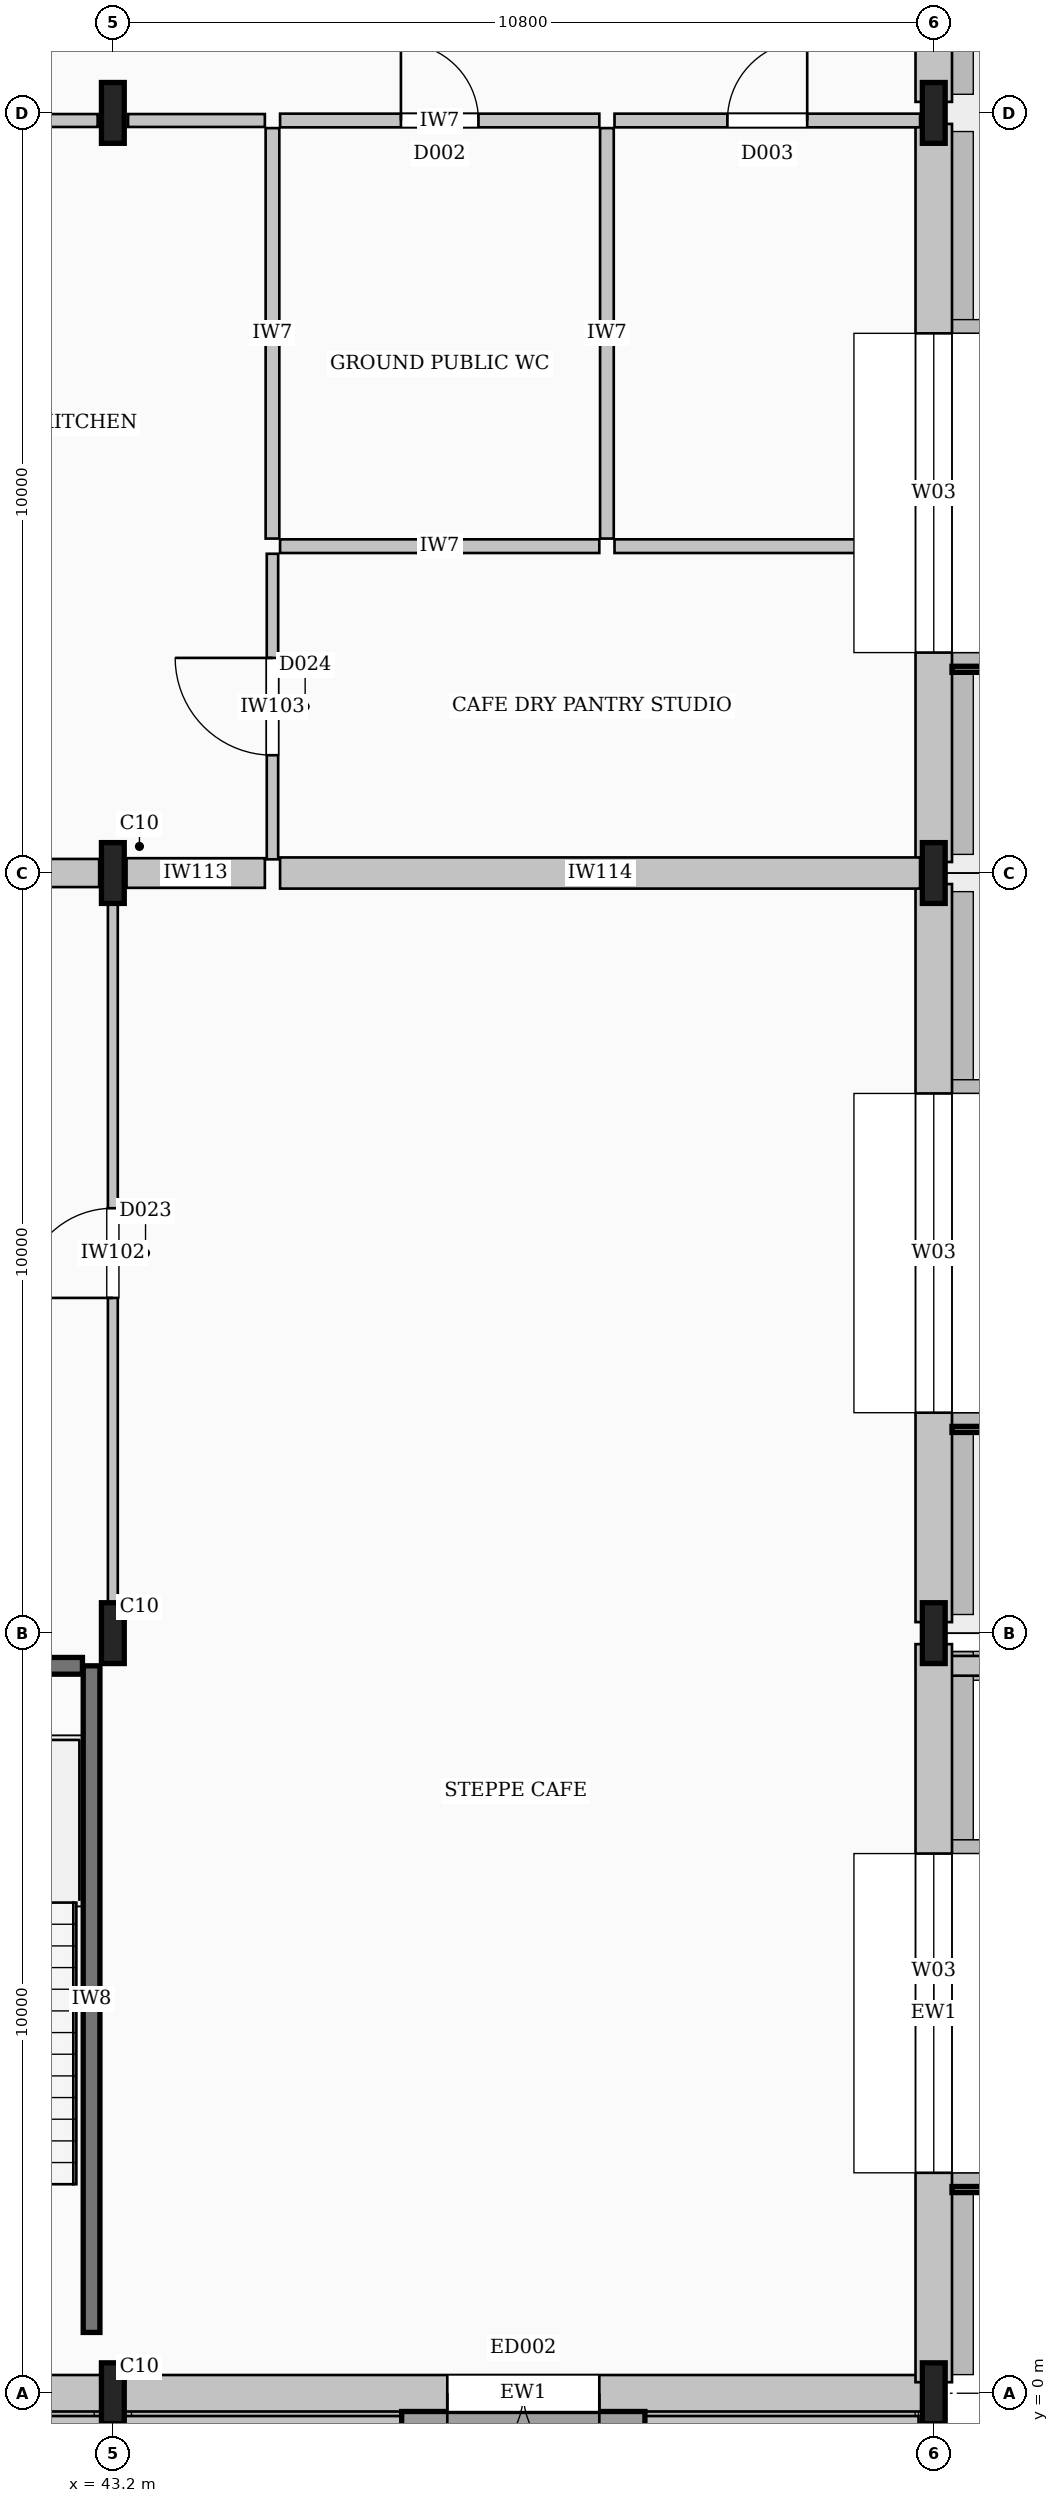
"""IFC4 building model, lengths in metres.
Left out: names, types, materials, properties, quantities, classifications, styles, units other than length and angle.
Written with IfcOpenShell. Run it as: python <this file> out.ifc"""

import sys

from ifc_helpers import new_model, si_unit, direction, frame, frame_2d, origin, origin_2d, place, context, subcontext, project, spatial, rectangle, i_section, extrude, element, fill, save


model = new_model("IFC4")
c1 = context("Model", 3, precision=1e-05, world=origin(), true_north=direction((0.0, 1.0)))
c2 = subcontext(c1, "Body", "Model", "MODEL_VIEW")
j1 = project(units=[si_unit("LENGTHUNIT", "METRE"), si_unit("PLANEANGLEUNIT", "RADIAN")], contexts=[c1])
p1 = place(None, origin())
s1 = spatial("IfcSite", under=j1, at=p1, CompositionType="ELEMENT")
p2 = place(p1, origin())
s2 = spatial("IfcBuilding", under=s1, at=p2, CompositionType="ELEMENT")
p3 = place(p2, origin())
s3 = spatial("IfcBuildingStorey", under=s2, at=p3, CompositionType="ELEMENT", Elevation=0.0)
for number, where, z_axis, x_axis in (
    (1, (43.2, 0.0, 0.0), (0.0, 0.0, 1.0), (1.0, 0.0, 0.0)),
    (2, (43.2, 10.0, 0.0), (0.0, 0.0, 1.0), (1.0, 0.0, 0.0)),
    (3, (43.2, 20.0, 0.0), (0.0, 0.0, 1.0), (1.0, 0.0, 0.0)),
    (4, (43.2, 30.0, 0.0), (0.0, 0.0, 1.0), (1.0, 0.0, 0.0)),
    (5, (54.0, 0.0, 0.0), (0.0, 0.0, 1.0), (1.0, 0.0, 0.0)),
    (6, (54.0, 10.0, 0.0), (0.0, 0.0, 1.0), (1.0, 0.0, 0.0)),
    (7, (54.0, 20.0, 0.0), (0.0, 0.0, 1.0), (1.0, 0.0, 0.0)),
    (8, (54.0, 30.0, 0.0), (0.0, 0.0, 1.0), (1.0, 0.0, 0.0)),
):
    element("IfcColumn", number, at=place(p3, frame(where, z_axis=z_axis, x_axis=x_axis)), inside=s3, PredefinedType="COLUMN", context=c2, shape_type="SweptSolid", body=[
        extrude(i_section(OverallWidth=0.3, OverallDepth=0.8, WebThickness=0.018, FlangeThickness=0.033, FilletRadius=0.03, at=origin_2d()), origin(), (0.0, 0.0, 1.0), 4.8),
    ])
for number, where, z_axis, x_axis in (
    (9, (0.2, -0.43, -1.38), (0.0, 0.0, 1.0), (1.0, 0.0, 0.0)),
    (10, (54.2, 9.57, -1.38), (0.0, 0.0, 1.0), (1.0, 0.0, 0.0)),
):
    element("IfcWall", number, at=place(p3, frame(where, z_axis=z_axis, x_axis=x_axis)), inside=s3, PredefinedType="PARAPET", context=c2, shape_type="SweptSolid", body=[
        extrude(rectangle(XDim=53.6, YDim=0.26, at=frame_2d((26.8, 0.0))), origin(), (0.0, 0.0, 1.0), 1.36),
    ])
p4 = place(p3, frame((32.545, 0.0, 0.0), z_axis=(0.0, 0.0, 1.0), x_axis=(1.0, 0.0, 0.0)))
e11 = element("IfcWall", 11, at=p4, inside=s3, PredefinedType="STANDARD", context=c2, shape_type="SweptSolid", body=[
    extrude(rectangle(XDim=10.51, YDim=0.48, at=frame_2d((5.255, 0.0))), origin(), (0.0, 0.0, 1.0), 4.069),
])
p5 = place(p4, frame((4.255, 0.0, 0.0)))
e12 = element("IfcOpeningElement", 12, at=p5, cuts=e11, PredefinedType="OPENING", context=c2, shape_type="SweptSolid", body=[
    extrude(rectangle(XDim=2.0, YDim=2.3, at=frame_2d((1.0, 1.15))), frame((0.0, 0.25, 0.0), z_axis=(0.0, -1.0, 0.0), x_axis=(1.0, 0.0, 0.0)), (0.0, 0.0, 1.0), 0.5),
])
p6 = place(p3, frame((43.345, 0.0, 0.0), z_axis=(0.0, 0.0, 1.0), x_axis=(1.0, 0.0, 0.0)))
e13 = element("IfcWall", 13, at=p6, inside=s3, PredefinedType="STANDARD", context=c2, shape_type="SweptSolid", body=[
    extrude(rectangle(XDim=10.51, YDim=0.48, at=frame_2d((5.255, 0.0))), origin(), (0.0, 0.0, 1.0), 4.069),
])
p7 = place(p6, frame((4.255, 0.0, 0.0)))
e14 = element("IfcOpeningElement", 14, at=p7, cuts=e13, PredefinedType="OPENING", context=c2, shape_type="SweptSolid", body=[
    extrude(rectangle(XDim=2.0, YDim=2.3, at=frame_2d((1.0, 1.15))), frame((0.0, 0.25, 0.0), z_axis=(0.0, -1.0, 0.0), x_axis=(1.0, 0.0, 0.0)), (0.0, 0.0, 1.0), 0.5),
])
p8 = place(p3, frame((54.0, 0.145, 0.0), z_axis=(0.0, 0.0, 1.0), x_axis=(0.0, 1.0, 0.0)))
e15 = element("IfcWall", 15, at=p8, inside=s3, PredefinedType="STANDARD", context=c2, shape_type="SweptSolid", body=[
    extrude(rectangle(XDim=9.71, YDim=0.48, at=frame_2d((4.855, 0.0))), origin(), (0.0, 0.0, 1.0), 4.56),
])
p9 = place(p8, frame((2.755, 0.0, 0.9)))
e16 = element("IfcOpeningElement", 16, at=p9, cuts=e15, PredefinedType="OPENING", context=c2, shape_type="SweptSolid", body=[
    extrude(rectangle(XDim=4.2, YDim=2.7, at=frame_2d((2.1, 1.35))), frame((0.0, 0.25, 0.0), z_axis=(0.0, -1.0, 0.0), x_axis=(1.0, 0.0, 0.0)), (0.0, 0.0, 1.0), 0.5),
])
p10 = place(p3, frame((54.0, 10.145, 0.0), z_axis=(0.0, 0.0, 1.0), x_axis=(0.0, 1.0, 0.0)))
e17 = element("IfcWall", 17, at=p10, inside=s3, PredefinedType="STANDARD", context=c2, shape_type="SweptSolid", body=[
    extrude(rectangle(XDim=9.71, YDim=0.48, at=frame_2d((4.855, 0.0))), origin(), (0.0, 0.0, 1.0), 4.56),
])
p11 = place(p10, frame((2.755, 0.0, 0.9)))
e18 = element("IfcOpeningElement", 18, at=p11, cuts=e17, PredefinedType="OPENING", context=c2, shape_type="SweptSolid", body=[
    extrude(rectangle(XDim=4.2, YDim=2.7, at=frame_2d((2.1, 1.35))), frame((0.0, 0.25, 0.0), z_axis=(0.0, -1.0, 0.0), x_axis=(1.0, 0.0, 0.0)), (0.0, 0.0, 1.0), 0.5),
])
p12 = place(p3, frame((54.0, 20.145, 0.0), z_axis=(0.0, 0.0, 1.0), x_axis=(0.0, 1.0, 0.0)))
e19 = element("IfcWall", 19, at=p12, inside=s3, PredefinedType="STANDARD", context=c2, shape_type="SweptSolid", body=[
    extrude(rectangle(XDim=9.71, YDim=0.48, at=frame_2d((4.855, 0.0))), origin(), (0.0, 0.0, 1.0), 4.56),
])
p13 = place(p12, frame((2.755, 0.0, 0.9)))
e20 = element("IfcOpeningElement", 20, at=p13, cuts=e19, PredefinedType="OPENING", context=c2, shape_type="SweptSolid", body=[
    extrude(rectangle(XDim=4.2, YDim=2.7, at=frame_2d((2.1, 1.35))), frame((0.0, 0.25, 0.0), z_axis=(0.0, -1.0, 0.0), x_axis=(1.0, 0.0, 0.0)), (0.0, 0.0, 1.0), 0.5),
])
p14 = place(p3, frame((54.0, 30.145, 0.0), z_axis=(0.0, 0.0, 1.0), x_axis=(0.0, 1.0, 0.0)))
e21 = element("IfcWall", 21, at=p14, inside=s3, PredefinedType="STANDARD", context=c2, shape_type="SweptSolid", body=[
    extrude(rectangle(XDim=9.71, YDim=0.48, at=frame_2d((4.855, 0.0))), origin(), (0.0, 0.0, 1.0), 4.56),
])
p15 = place(p14, frame((2.755, 0.0, 0.9)))
e22 = element("IfcOpeningElement", 22, at=p15, cuts=e21, PredefinedType="OPENING", context=c2, shape_type="SweptSolid", body=[
    extrude(rectangle(XDim=4.2, YDim=2.7, at=frame_2d((2.1, 1.35))), frame((0.0, 0.25, 0.0), z_axis=(0.0, -1.0, 0.0), x_axis=(1.0, 0.0, 0.0)), (0.0, 0.0, 1.0), 0.5),
])
p16 = place(p3, frame((42.92, 0.8, 0.0), z_axis=(0.0, 0.0, 1.0), x_axis=(0.0, 1.0, 0.0)))
e23 = element("IfcWall", 23, at=p16, inside=s3, PredefinedType="SHEAR", context=c2, shape_type="SweptSolid", body=[
    extrude(rectangle(XDim=8.77, YDim=0.22, at=frame_2d((4.385, 0.0))), origin(), (0.0, 0.0, 1.0), 4.56),
])
p17 = place(p3, frame((38.4, 9.57, 0.0), z_axis=(0.0, 0.0, 1.0), x_axis=(1.0, 0.0, 0.0)))
e24 = element("IfcWall", 24, at=p17, inside=s3, PredefinedType="SHEAR", context=c2, shape_type="SweptSolid", body=[
    extrude(rectangle(XDim=4.4, YDim=0.22, at=frame_2d((2.2, 0.0))), origin(), (0.0, 0.0, 1.0), 4.56),
])
p18 = place(p3, frame((45.4, 29.9, 0.0), z_axis=(0.0, 0.0, 1.0), x_axis=(1.0, 0.0, 0.0)))
e25 = element("IfcWall", 25, at=p18, inside=s3, PredefinedType="PLUMBINGWALL", context=c2, shape_type="SweptSolid", body=[
    extrude(rectangle(XDim=4.2, YDim=0.18, at=frame_2d((2.1, 0.0))), origin(), (0.0, 0.0, 1.0), 4.069),
])
p19 = place(p18, frame((1.59, 0.0, 0.0)))
e26 = element("IfcOpeningElement", 26, at=p19, cuts=e25, PredefinedType="OPENING", context=c2, shape_type="SweptSolid", body=[
    extrude(rectangle(XDim=1.02, YDim=2.15, at=frame_2d((0.51, 1.075))), frame((0.0, 0.1, 0.0), z_axis=(0.0, -1.0, 0.0), x_axis=(1.0, 0.0, 0.0)), (0.0, 0.0, 1.0), 0.2),
])
p20 = place(p3, frame((49.8, 29.9, 0.0), z_axis=(0.0, 0.0, 1.0), x_axis=(1.0, 0.0, 0.0)))
e27 = element("IfcWall", 27, at=p20, inside=s3, PredefinedType="PLUMBINGWALL", context=c2, shape_type="SweptSolid", body=[
    extrude(rectangle(XDim=4.02, YDim=0.18, at=frame_2d((2.01, 0.0))), origin(), (0.0, 0.0, 1.0), 4.069),
])
p21 = place(p20, frame((1.485, 0.0, 0.0)))
e28 = element("IfcOpeningElement", 28, at=p21, cuts=e27, PredefinedType="OPENING", context=c2, shape_type="SweptSolid", body=[
    extrude(rectangle(XDim=1.05, YDim=2.15, at=frame_2d((0.525, 1.075))), frame((0.0, 0.1, 0.0), z_axis=(0.0, -1.0, 0.0), x_axis=(1.0, 0.0, 0.0)), (0.0, 0.0, 1.0), 0.2),
])
p22 = place(p3, frame((43.2, 10.18, 0.0), z_axis=(0.0, 0.0, 1.0), x_axis=(0.0, 1.0, 0.0)))
e29 = element("IfcWall", 29, at=p22, inside=s3, PredefinedType="PARTITIONING", context=c2, shape_type="SweptSolid", body=[
    extrude(rectangle(XDim=9.64, YDim=0.13, at=frame_2d((4.82, 0.0))), origin(), (0.0, 0.0, 1.0), 4.06),
])
p23 = place(p22, frame((4.23, 0.0, 0.0)))
e30 = element("IfcOpeningElement", 30, at=p23, cuts=e29, PredefinedType="OPENING", context=c2, shape_type="SweptSolid", body=[
    extrude(rectangle(XDim=1.18, YDim=2.28, at=frame_2d((0.59, 1.14))), frame((0.0, 0.075, 0.0), z_axis=(0.0, -1.0, 0.0), x_axis=(1.0, 0.0, 0.0)), (0.0, 0.0, 1.0), 0.15),
])
p24 = place(p3, frame((45.3, 20.18, 0.0), z_axis=(0.0, 0.0, 1.0), x_axis=(0.0, 1.0, 0.0)))
e31 = element("IfcWall", 31, at=p24, inside=s3, PredefinedType="PARTITIONING", context=c2, shape_type="SweptSolid", body=[
    extrude(rectangle(XDim=4.02, YDim=0.15, at=frame_2d((2.01, 0.0))), origin(), (0.0, 0.0, 1.0), 4.52),
])
p25 = place(p24, frame((1.37, 0.0, 0.0)))
e32 = element("IfcOpeningElement", 32, at=p25, cuts=e31, PredefinedType="OPENING", context=c2, shape_type="SweptSolid", body=[
    extrude(rectangle(XDim=1.28, YDim=2.32, at=frame_2d((0.64, 1.16))), frame((0.0, 0.085, 0.0), z_axis=(0.0, -1.0, 0.0), x_axis=(1.0, 0.0, 0.0)), (0.0, 0.0, 1.0), 0.17),
])
p26 = place(p3, frame((37.0, 20.0, 0.0), z_axis=(0.0, 0.0, 1.0), x_axis=(1.0, 0.0, 0.0)))
e33 = element("IfcWall", 33, at=p26, inside=s3, PredefinedType="PARTITIONING", context=c2, shape_type="SweptSolid", body=[
    extrude(rectangle(XDim=6.02, YDim=0.37, at=frame_2d((3.01, 0.0))), origin(), (0.0, 0.0, 1.0), 4.069),
])
p27 = place(p3, frame((43.38, 20.0, 0.0), z_axis=(0.0, 0.0, 1.0), x_axis=(1.0, 0.0, 0.0)))
e34 = element("IfcWall", 34, at=p27, inside=s3, PredefinedType="PARTITIONING", context=c2, shape_type="SweptSolid", body=[
    extrude(rectangle(XDim=1.82, YDim=0.39, at=frame_2d((0.91, 0.0))), origin(), (0.0, 0.0, 1.0), 4.069),
])
p28 = place(p3, frame((45.4, 20.0, 0.0), z_axis=(0.0, 0.0, 1.0), x_axis=(1.0, 0.0, 0.0)))
e35 = element("IfcWall", 35, at=p28, inside=s3, PredefinedType="PARTITIONING", context=c2, shape_type="SweptSolid", body=[
    extrude(rectangle(XDim=8.42, YDim=0.41, at=frame_2d((4.21, 0.0))), origin(), (0.0, 0.0, 1.0), 4.069),
])
p29 = place(p3, frame((45.4, 24.3, 0.0), z_axis=(0.0, 0.0, 1.0), x_axis=(1.0, 0.0, 0.0)))
e36 = element("IfcWall", 36, at=p29, inside=s3, PredefinedType="PLUMBINGWALL", context=c2, shape_type="SweptSolid", body=[
    extrude(rectangle(XDim=4.2, YDim=0.18, at=frame_2d((2.1, 0.0))), origin(), (0.0, 0.0, 1.0), 4.52),
])
p30 = place(p3, frame((49.8, 24.3, 0.0), z_axis=(0.0, 0.0, 1.0), x_axis=(1.0, 0.0, 0.0)))
e37 = element("IfcWall", 37, at=p30, inside=s3, PredefinedType="PLUMBINGWALL", context=c2, shape_type="SweptSolid", body=[
    extrude(rectangle(XDim=4.02, YDim=0.18, at=frame_2d((2.01, 0.0))), origin(), (0.0, 0.0, 1.0), 4.52),
])
p31 = place(p3, frame((37.0, 29.9, 0.0), z_axis=(0.0, 0.0, 1.0), x_axis=(1.0, 0.0, 0.0)))
e38 = element("IfcWall", 38, at=p31, inside=s3, PredefinedType="PARTITIONING", context=c2, shape_type="SweptSolid", body=[
    extrude(rectangle(XDim=6.0, YDim=0.17, at=frame_2d((3.0, 0.0))), origin(), (0.0, 0.0, 1.0), 4.069),
])
p32 = place(p3, frame((43.4, 29.9, 0.0), z_axis=(0.0, 0.0, 1.0), x_axis=(1.0, 0.0, 0.0)))
e39 = element("IfcWall", 39, at=p32, inside=s3, PredefinedType="PARTITIONING", context=c2, shape_type="SweptSolid", body=[
    extrude(rectangle(XDim=1.8, YDim=0.17, at=frame_2d((0.9, 0.0))), origin(), (0.0, 0.0, 1.0), 4.069),
])
for number, where, z_axis, x_axis in (
    (40, (45.3, 24.4, 0.0), (0.0, 0.0, 1.0), (0.0, 1.0, 0.0)),
    (41, (49.7, 24.4, 0.0), (0.0, 0.0, 1.0), (0.0, 1.0, 0.0)),
):
    element("IfcWall", number, at=place(p3, frame(where, z_axis=z_axis, x_axis=x_axis)), inside=s3, PredefinedType="PLUMBINGWALL", context=c2, shape_type="SweptSolid", body=[
        extrude(rectangle(XDim=5.4, YDim=0.18, at=frame_2d((2.7, 0.0))), origin(), (0.0, 0.0, 1.0), 4.52),
    ])
p33 = place(p7, frame((2.0, 0.0, 0.0), z_axis=(0.0, 0.0, 1.0), x_axis=(-1.0, 0.0, 0.0)))
e42 = element("IfcDoor", 42, at=p33, inside=s3, OperationType="DOUBLE_DOOR_SINGLE_SWING", PredefinedType="DOOR", context=c2, shape_type="SweptSolid", body=[
    extrude(rectangle(XDim=2.0, YDim=2.3, at=frame_2d((1.0, 1.15))), frame((0.0, 0.025, 0.0), z_axis=(0.0, -1.0, 0.0), x_axis=(1.0, 0.0, 0.0)), (0.0, 0.0, 1.0), 0.05),
])
fill(e14, e42)
p34 = place(p9, origin())
e43 = element("IfcWindow", 43, at=p34, inside=s3, PartitioningType="SINGLE_PANEL", PredefinedType="WINDOW", context=c2, shape_type="SweptSolid", body=[
    extrude(rectangle(XDim=4.2, YDim=2.7, at=frame_2d((2.1, 1.35))), frame((0.0, 0.03, 0.0), z_axis=(0.0, -1.0, 0.0), x_axis=(1.0, 0.0, 0.0)), (0.0, 0.0, 1.0), 0.06),
])
fill(e16, e43)
p35 = place(p11, origin())
e44 = element("IfcWindow", 44, at=p35, inside=s3, PartitioningType="SINGLE_PANEL", PredefinedType="WINDOW", context=c2, shape_type="SweptSolid", body=[
    extrude(rectangle(XDim=4.2, YDim=2.7, at=frame_2d((2.1, 1.35))), frame((0.0, 0.03, 0.0), z_axis=(0.0, -1.0, 0.0), x_axis=(1.0, 0.0, 0.0)), (0.0, 0.0, 1.0), 0.06),
])
fill(e18, e44)
p36 = place(p13, origin())
e45 = element("IfcWindow", 45, at=p36, inside=s3, PartitioningType="SINGLE_PANEL", PredefinedType="WINDOW", context=c2, shape_type="SweptSolid", body=[
    extrude(rectangle(XDim=4.2, YDim=2.7, at=frame_2d((2.1, 1.35))), frame((0.0, 0.03, 0.0), z_axis=(0.0, -1.0, 0.0), x_axis=(1.0, 0.0, 0.0)), (0.0, 0.0, 1.0), 0.06),
])
fill(e20, e45)
p37 = place(p19, origin())
e46 = element("IfcDoor", 46, at=p37, inside=s3, OperationType="SINGLE_SWING_LEFT", PredefinedType="DOOR", context=c2, shape_type="SweptSolid", body=[
    extrude(rectangle(XDim=1.02, YDim=2.15, at=frame_2d((0.51, 1.075))), frame((0.0, 0.025, 0.0), z_axis=(0.0, -1.0, 0.0), x_axis=(1.0, 0.0, 0.0)), (0.0, 0.0, 1.0), 0.05),
])
fill(e26, e46)
p38 = place(p21, origin())
e47 = element("IfcDoor", 47, at=p38, inside=s3, OperationType="SINGLE_SWING_RIGHT", PredefinedType="DOOR", context=c2, shape_type="SweptSolid", body=[
    extrude(rectangle(XDim=1.05, YDim=2.15, at=frame_2d((0.525, 1.075))), frame((0.0, 0.025, 0.0), z_axis=(0.0, -1.0, 0.0), x_axis=(1.0, 0.0, 0.0)), (0.0, 0.0, 1.0), 0.05),
])
fill(e28, e47)
p39 = place(p23, origin())
e48 = element("IfcDoor", 48, at=p39, inside=s3, OperationType="SINGLE_SWING_LEFT", PredefinedType="DOOR", context=c2, shape_type="SweptSolid", body=[
    extrude(rectangle(XDim=1.18, YDim=2.28, at=frame_2d((0.59, 1.14))), frame((0.0, 0.025, 0.0), z_axis=(0.0, -1.0, 0.0), x_axis=(1.0, 0.0, 0.0)), (0.0, 0.0, 1.0), 0.05),
])
fill(e30, e48)
p40 = place(p25, origin())
e49 = element("IfcDoor", 49, at=p40, inside=s3, OperationType="SINGLE_SWING_RIGHT", PredefinedType="DOOR", context=c2, shape_type="SweptSolid", body=[
    extrude(rectangle(XDim=1.28, YDim=2.32, at=frame_2d((0.64, 1.16))), frame((0.0, 0.025, 0.0), z_axis=(0.0, -1.0, 0.0), x_axis=(1.0, 0.0, 0.0)), (0.0, 0.0, 1.0), 0.05),
])
fill(e32, e49)
save(model, sys.argv[1])
